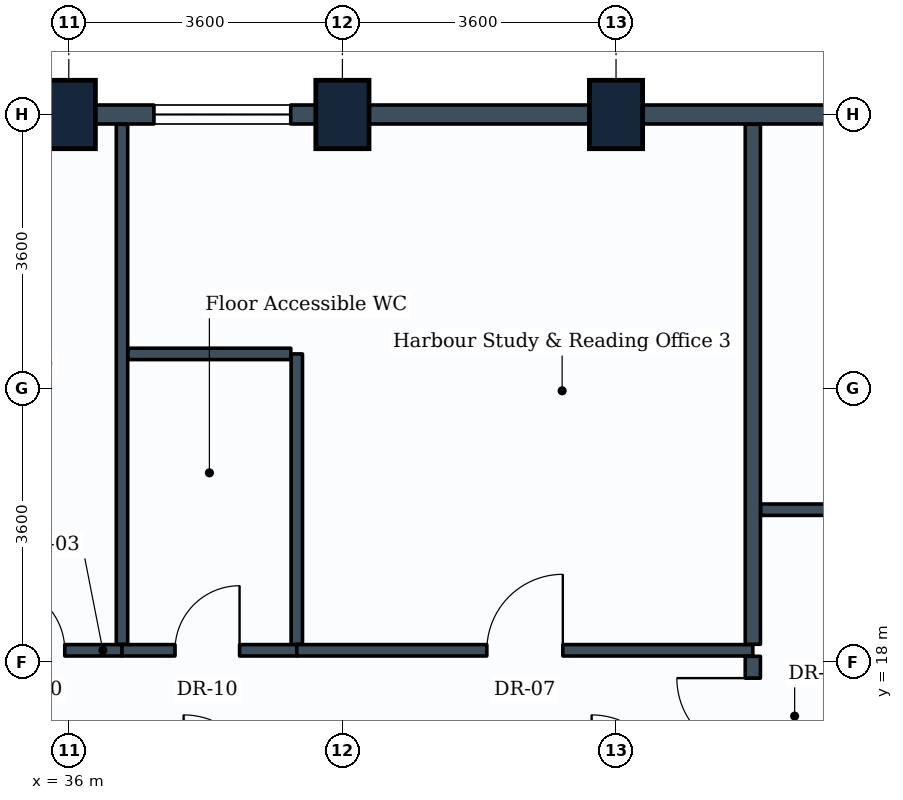
"""IFC4 building model, lengths in metres.
Left out: names, types, materials, properties, quantities, classifications, styles, units other than length and angle.
Written with IfcOpenShell. Run it as: python <this file> out.ifc"""

import sys

from ifc_helpers import new_model, si_unit, direction, frame, frame_2d, origin, origin_2d, place, context, subcontext, project, spatial, rectangle, extrude, element, fill, save


model = new_model("IFC4")
c1 = context("Model", 3, precision=1e-05, world=origin(), true_north=direction((0.0, 1.0)))
c2 = subcontext(c1, "Body", "Model", "MODEL_VIEW")
j1 = project(units=[si_unit("LENGTHUNIT", "METRE"), si_unit("PLANEANGLEUNIT", "RADIAN")], contexts=[c1])
p1 = place(None, origin())
s1 = spatial("IfcSite", under=j1, at=p1, CompositionType="ELEMENT")
p2 = place(p1, origin())
s2 = spatial("IfcBuilding", under=s1, at=p2, CompositionType="ELEMENT")
p3 = place(p2, frame((0.0, 0.0, 174.8)))
s3 = spatial("IfcBuildingStorey", under=s2, at=p3, CompositionType="ELEMENT", Elevation=174.8)
for number, where, z_axis, x_axis in (
    (1, (36.0, 25.2, 0.0), (0.0, 0.0, 1.0), (1.0, 0.0, 0.0)),
    (2, (39.6, 25.2, 0.0), (0.0, 0.0, 1.0), (1.0, 0.0, 0.0)),
    (3, (43.2, 25.2, 0.0), (0.0, 0.0, 1.0), (1.0, 0.0, 0.0)),
):
    element("IfcColumn", number, at=place(p3, frame(where, z_axis=z_axis, x_axis=x_axis)), inside=s3, PredefinedType="COLUMN", context=c2, shape_type="SweptSolid", body=[
        extrude(rectangle(XDim=0.7, YDim=0.9, at=origin_2d()), origin(), (0.0, 0.0, 1.0), 3.8),
    ])
p4 = place(p3, frame((43.2, 25.2, 0.0), z_axis=(0.0, 0.0, 1.0), x_axis=(1.0, 0.0, 0.0)))
e4 = element("IfcWall", 4, at=p4, inside=s3, PredefinedType="STANDARD", context=c2, shape_type="SweptSolid", body=[
    extrude(rectangle(XDim=3.6, YDim=0.25, at=frame_2d((1.8, 0.0))), origin(), (0.0, 0.0, 1.0), 2.93),
])
p5 = place(p3, frame((39.6, 25.2, 0.0), z_axis=(0.0, 0.0, 1.0), x_axis=(1.0, 0.0, 0.0)))
e5 = element("IfcWall", 5, at=p5, inside=s3, PredefinedType="STANDARD", context=c2, shape_type="SweptSolid", body=[
    extrude(rectangle(XDim=3.6, YDim=0.25, at=frame_2d((1.8, 0.0))), origin(), (0.0, 0.0, 1.0), 2.93),
])
p6 = place(p3, frame((36.0, 25.2, 0.0), z_axis=(0.0, 0.0, 1.0), x_axis=(1.0, 0.0, 0.0)))
e6 = element("IfcWall", 6, at=p6, inside=s3, PredefinedType="STANDARD", context=c2, shape_type="SweptSolid", body=[
    extrude(rectangle(XDim=3.6, YDim=0.25, at=frame_2d((1.8, 0.0))), origin(), (0.0, 0.0, 1.0), 2.93),
])
p7 = place(p6, frame((1.12, 0.0, 0.85)))
e7 = element("IfcOpeningElement", 7, at=p7, cuts=e6, PredefinedType="OPENING", context=c2, shape_type="SweptSolid", body=[
    extrude(rectangle(XDim=1.8, YDim=1.35, at=frame_2d((0.9, 0.675))), frame((0.0, 0.135, 0.0), z_axis=(0.0, -1.0, 0.0), x_axis=(1.0, 0.0, 0.0)), (0.0, 0.0, 1.0), 0.27),
])
p8 = place(p3, frame((32.4, 25.2, 0.0), z_axis=(0.0, 0.0, 1.0), x_axis=(1.0, 0.0, 0.0)))
e8 = element("IfcWall", 8, at=p8, inside=s3, PredefinedType="STANDARD", context=c2, shape_type="SweptSolid", body=[
    extrude(rectangle(XDim=3.6, YDim=0.25, at=frame_2d((1.8, 0.0))), origin(), (0.0, 0.0, 1.0), 2.93),
])
p9 = place(p3, frame((34.479, 18.15, 0.0), z_axis=(0.0, 0.0, 1.0), x_axis=(1.0, 0.0, 0.0)))
e9 = element("IfcWall", 9, at=p9, inside=s3, PredefinedType="PARTITIONING", context=c2, shape_type="SweptSolid", body=[
    extrude(rectangle(XDim=2.221, YDim=0.15, at=frame_2d((1.11, 0.0))), origin(), (0.0, 0.0, 1.0), 3.2),
])
p10 = place(p9, frame((0.618, 0.0, 0.0)))
e10 = element("IfcOpeningElement", 10, at=p10, cuts=e9, PredefinedType="OPENING", context=c2, shape_type="SweptSolid", body=[
    extrude(rectangle(XDim=0.85, YDim=2.1, at=frame_2d((0.425, 1.05))), frame((0.0, 0.085, 0.0), z_axis=(0.0, -1.0, 0.0), x_axis=(1.0, 0.0, 0.0)), (0.0, 0.0, 1.0), 0.17),
])
p11 = place(p3, frame((36.7, 18.229, 0.0), z_axis=(0.0, 0.0, 1.0), x_axis=(0.0, 1.0, 0.0)))
e11 = element("IfcWall", 11, at=p11, inside=s3, PredefinedType="PARTITIONING", context=c2, shape_type="SweptSolid", body=[
    extrude(rectangle(XDim=6.842, YDim=0.15, at=frame_2d((3.421, 0.0))), origin(), (0.0, 0.0, 1.0), 2.93),
])
p12 = place(p3, frame((36.7, 18.15, 0.0), z_axis=(0.0, 0.0, 1.0), x_axis=(1.0, 0.0, 0.0)))
e12 = element("IfcWall", 12, at=p12, inside=s3, PredefinedType="PARTITIONING", context=c2, shape_type="SweptSolid", body=[
    extrude(rectangle(XDim=2.3, YDim=0.15, at=frame_2d((1.15, 0.0))), origin(), (0.0, 0.0, 1.0), 3.2),
])
p13 = place(p12, frame((0.697, 0.0, 0.0)))
e13 = element("IfcOpeningElement", 13, at=p13, cuts=e12, PredefinedType="OPENING", context=c2, shape_type="SweptSolid", body=[
    extrude(rectangle(XDim=0.85, YDim=2.1, at=frame_2d((0.425, 1.05))), frame((0.0, 0.085, 0.0), z_axis=(0.0, -1.0, 0.0), x_axis=(1.0, 0.0, 0.0)), (0.0, 0.0, 1.0), 0.17),
])
p14 = place(p3, frame((39.0, 18.229, 0.0), z_axis=(0.0, 0.0, 1.0), x_axis=(0.0, 1.0, 0.0)))
e14 = element("IfcWall", 14, at=p14, inside=s3, PredefinedType="PARTITIONING", context=c2, shape_type="SweptSolid", body=[
    extrude(rectangle(XDim=3.821, YDim=0.15, at=frame_2d((1.911, 0.0))), origin(), (0.0, 0.0, 1.0), 3.17),
])
p15 = place(p3, frame((36.779, 22.05, 0.0), z_axis=(0.0, 0.0, 1.0), x_axis=(1.0, 0.0, 0.0)))
e15 = element("IfcWall", 15, at=p15, inside=s3, PredefinedType="PARTITIONING", context=c2, shape_type="SweptSolid", body=[
    extrude(rectangle(XDim=2.142, YDim=0.15, at=frame_2d((1.071, 0.0))), origin(), (0.0, 0.0, 1.0), 3.535),
])
p16 = place(p3, frame((39.0, 18.15, 0.0), z_axis=(0.0, 0.0, 1.0), x_axis=(1.0, 0.0, 0.0)))
e16 = element("IfcWall", 16, at=p16, inside=s3, PredefinedType="PARTITIONING", context=c2, shape_type="SweptSolid", body=[
    extrude(rectangle(XDim=6.0, YDim=0.15, at=frame_2d((3.0, 0.0))), origin(), (0.0, 0.0, 1.0), 3.17),
])
p17 = place(p16, frame((2.5, 0.0, 0.0)))
e17 = element("IfcOpeningElement", 17, at=p17, cuts=e16, PredefinedType="OPENING", context=c2, shape_type="SweptSolid", body=[
    extrude(rectangle(XDim=1.0, YDim=2.1, at=frame_2d((0.5, 1.05))), frame((0.0, 0.085, 0.0), z_axis=(0.0, -1.0, 0.0), x_axis=(1.0, 0.0, 0.0)), (0.0, 0.0, 1.0), 0.17),
])
p18 = place(p3, frame((45.0, 18.229, 0.0), z_axis=(0.0, 0.0, 1.0), x_axis=(0.0, 1.0, 0.0)))
e18 = element("IfcWall", 18, at=p18, inside=s3, PredefinedType="PARTITIONING", context=c2, shape_type="SweptSolid", body=[
    extrude(rectangle(XDim=6.842, YDim=0.2, at=frame_2d((3.421, 0.0))), origin(), (0.0, 0.0, 1.0), 2.93),
])
p19 = place(p3, frame((45.0, 16.404, 0.0), z_axis=(0.0, 0.0, 1.0), x_axis=(0.0, 1.0, 0.0)))
e19 = element("IfcWall", 19, at=p19, inside=s3, PredefinedType="PARTITIONING", context=c2, shape_type="SweptSolid", body=[
    extrude(rectangle(XDim=1.667, YDim=0.2, at=frame_2d((0.833, 0.0))), origin(), (0.0, 0.0, 1.0), 3.535),
])
p20 = place(p19, frame((0.38, 0.0, 0.0)))
e20 = element("IfcOpeningElement", 20, at=p20, cuts=e19, PredefinedType="OPENING", context=c2, shape_type="SweptSolid", body=[
    extrude(rectangle(XDim=1.0, YDim=2.1, at=frame_2d((0.5, 1.05))), frame((0.0, 0.11, 0.0), z_axis=(0.0, -1.0, 0.0), x_axis=(1.0, 0.0, 0.0)), (0.0, 0.0, 1.0), 0.22),
])
p21 = place(p3, frame((45.104, 20.0, 0.0), z_axis=(0.0, 0.0, 1.0), x_axis=(1.0, 0.0, 0.0)))
e21 = element("IfcWall", 21, at=p21, inside=s3, PredefinedType="PARTITIONING", context=c2, shape_type="SweptSolid", body=[
    extrude(rectangle(XDim=5.167, YDim=0.15, at=frame_2d((2.583, 0.0))), origin(), (0.0, 0.0, 1.0), 2.93),
])
p22 = place(p21, frame((1.516, 0.0, 0.0)))
e22 = element("IfcOpeningElement", 22, at=p22, cuts=e21, PredefinedType="OPENING", context=c2, shape_type="SweptSolid", body=[
    extrude(rectangle(XDim=0.9, YDim=2.1, at=frame_2d((0.45, 1.05))), frame((0.0, 0.085, 0.0), z_axis=(0.0, -1.0, 0.0), x_axis=(1.0, 0.0, 0.0)), (0.0, 0.0, 1.0), 0.17),
])
p23 = place(p7, origin())
e23 = element("IfcWindow", 23, at=p23, inside=s3, PartitioningType="SINGLE_PANEL", PredefinedType="WINDOW", context=c2, shape_type="SweptSolid", body=[
    extrude(rectangle(XDim=1.8, YDim=1.35, at=frame_2d((0.9, 0.675))), frame((0.0, 0.03, 0.0), z_axis=(0.0, -1.0, 0.0), x_axis=(1.0, 0.0, 0.0)), (0.0, 0.0, 1.0), 0.06),
])
fill(e7, e23)
p24 = place(p10, origin())
e24 = element("IfcDoor", 24, at=p24, inside=s3, OperationType="SINGLE_SWING_LEFT", PredefinedType="DOOR", context=c2, shape_type="SweptSolid", body=[
    extrude(rectangle(XDim=0.85, YDim=2.1, at=frame_2d((0.425, 1.05))), frame((0.0, 0.025, 0.0), z_axis=(0.0, -1.0, 0.0), x_axis=(1.0, 0.0, 0.0)), (0.0, 0.0, 1.0), 0.05),
])
fill(e10, e24)
p25 = place(p13, origin())
e25 = element("IfcDoor", 25, at=p25, inside=s3, OperationType="SINGLE_SWING_RIGHT", PredefinedType="DOOR", context=c2, shape_type="SweptSolid", body=[
    extrude(rectangle(XDim=0.85, YDim=2.1, at=frame_2d((0.425, 1.05))), frame((0.0, 0.025, 0.0), z_axis=(0.0, -1.0, 0.0), x_axis=(1.0, 0.0, 0.0)), (0.0, 0.0, 1.0), 0.05),
])
fill(e13, e25)
p26 = place(p17, origin())
e26 = element("IfcDoor", 26, at=p26, inside=s3, OperationType="SINGLE_SWING_RIGHT", PredefinedType="DOOR", context=c2, shape_type="SweptSolid", body=[
    extrude(rectangle(XDim=1.0, YDim=2.1, at=frame_2d((0.5, 1.05))), frame((0.0, 0.025, 0.0), z_axis=(0.0, -1.0, 0.0), x_axis=(1.0, 0.0, 0.0)), (0.0, 0.0, 1.0), 0.05),
])
fill(e17, e26)
p27 = place(p20, origin())
e27 = element("IfcDoor", 27, at=p27, inside=s3, OperationType="SINGLE_SWING_RIGHT", PredefinedType="DOOR", context=c2, shape_type="SweptSolid", body=[
    extrude(rectangle(XDim=1.0, YDim=2.1, at=frame_2d((0.5, 1.05))), frame((0.0, 0.025, 0.0), z_axis=(0.0, -1.0, 0.0), x_axis=(1.0, 0.0, 0.0)), (0.0, 0.0, 1.0), 0.05),
])
fill(e20, e27)
save(model, sys.argv[1])
